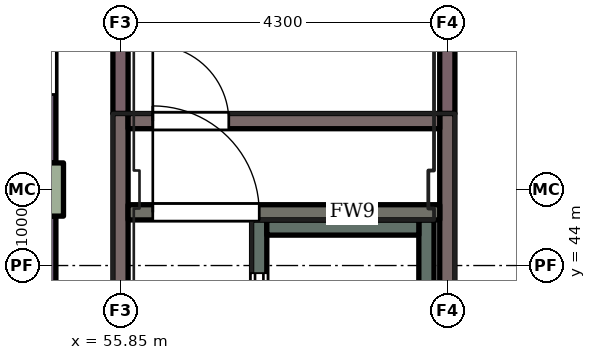
"""IFC4 building model, lengths in metres.
Left out: names, types, materials, properties, quantities, classifications, styles, units other than length and angle.
Written with IfcOpenShell. Run it as: python <this file> out.ifc"""

import sys

from ifc_helpers import new_model, si_unit, direction, frame, frame_2d, origin, origin_2d, place, context, subcontext, project, spatial, rectangle, extrude, element, fill, save


model = new_model("IFC4")
c1 = context("Model", 3, precision=1e-05, world=origin(), true_north=direction((0.0, 1.0)))
c2 = subcontext(c1, "Body", "Model", "MODEL_VIEW")
j1 = project(units=[si_unit("LENGTHUNIT", "METRE"), si_unit("PLANEANGLEUNIT", "RADIAN")], contexts=[c1])
p1 = place(None, origin())
s1 = spatial("IfcSite", under=j1, at=p1, CompositionType="ELEMENT")
p2 = place(p1, origin())
s2 = spatial("IfcBuilding", under=s1, at=p2, CompositionType="ELEMENT")
p3 = place(p2, frame((0.0, 0.0, 8.4)))
s3 = spatial("IfcBuildingStorey", under=s2, at=p3, CompositionType="ELEMENT", Elevation=8.4)
p4 = place(p3, frame((54.75, 45.0, 0.0), z_axis=(0.0, 0.0, 1.0), x_axis=(1.0, 0.0, 0.0)))
e1 = element("IfcColumn", 1, at=p4, inside=s3, PredefinedType="COLUMN", context=c2, shape_type="SweptSolid", body=[
    extrude(rectangle(XDim=0.7, YDim=0.7, at=origin_2d()), origin(), (0.0, 0.0, 1.0), 4.2),
])
p5 = place(p3, frame((54.75, 40.351, 0.0), z_axis=(0.0, 0.0, 1.0), x_axis=(0.0, 1.0, 0.0)))
e2 = element("IfcWall", 2, at=p5, inside=s3, PredefinedType="SHEAR", context=c2, shape_type="SweptSolid", body=[
    extrude(rectangle(XDim=4.299, YDim=0.5, at=frame_2d((2.149, 0.0))), origin(), (0.0, 0.0, 1.0), 3.4),
])
p6 = place(p5, frame((0.899, 0.0, 1.6)))
e3 = element("IfcOpeningElement", 3, at=p6, cuts=e2, PredefinedType="OPENING", context=c2, shape_type="SweptSolid", body=[
    extrude(rectangle(XDim=2.5, YDim=1.5, at=frame_2d((1.25, 0.75))), frame((0.0, 0.26, 0.0), z_axis=(0.0, -1.0, 0.0), x_axis=(1.0, 0.0, 0.0)), (0.0, 0.0, 1.0), 0.52),
])
p7 = place(p3, frame((54.75, 45.351, 0.0), z_axis=(0.0, 0.0, 1.0), x_axis=(0.0, 1.0, 0.0)))
e4 = element("IfcWall", 4, at=p7, inside=s3, PredefinedType="SHEAR", context=c2, shape_type="SweptSolid", body=[
    extrude(rectangle(XDim=4.299, YDim=0.5, at=frame_2d((2.149, 0.0))), origin(), (0.0, 0.0, 1.0), 3.4),
])
p8 = place(p7, frame((0.899, 0.0, 1.6)))
e5 = element("IfcOpeningElement", 5, at=p8, cuts=e4, PredefinedType="OPENING", context=c2, shape_type="SweptSolid", body=[
    extrude(rectangle(XDim=2.5, YDim=1.5, at=frame_2d((1.25, 0.75))), frame((0.0, 0.26, 0.0), z_axis=(0.0, -1.0, 0.0), x_axis=(1.0, 0.0, 0.0)), (0.0, 0.0, 1.0), 0.52),
])
for number, where, z_axis, x_axis in (
    (6, (60.15, 46.0, 0.0), (0.0, 0.0, 1.0), (0.0, 1.0, 0.0)),
    (7, (55.85, 46.0, 0.0), (0.0, 0.0, 1.0), (0.0, 1.0, 0.0)),
):
    element("IfcWall", number, at=place(p3, frame(where, z_axis=z_axis, x_axis=x_axis)), inside=s3, PredefinedType="PARAPET", context=c2, shape_type="SweptSolid", body=[
        extrude(rectangle(XDim=3.986, YDim=0.2, at=frame_2d((1.993, 0.0))), origin(), (0.0, 0.0, 1.0), 1.1),
    ])
p9 = place(p3, frame((57.675, 42.2, 0.0), z_axis=(0.0, 0.0, 1.0), x_axis=(0.0, 1.0, 0.0)))
e8 = element("IfcWall", 8, at=p9, inside=s3, PredefinedType="SHEAR", context=c2, shape_type="SweptSolid", body=[
    extrude(rectangle(XDim=2.4, YDim=0.2, at=frame_2d((1.2, 0.0))), origin(), (0.0, 0.0, 1.0), 3.0),
])
p10 = place(p9, frame((0.7, 0.0, 0.0)))
e9 = element("IfcOpeningElement", 9, at=p10, cuts=e8, PredefinedType="OPENING", context=c2, shape_type="SweptSolid", body=[
    extrude(rectangle(XDim=1.0, YDim=2.1, at=frame_2d((0.5, 1.05))), frame((0.0, 0.11, 0.0), z_axis=(0.0, -1.0, 0.0), x_axis=(1.0, 0.0, 0.0)), (0.0, 0.0, 1.0), 0.22),
])
p11 = place(p3, frame((59.875, 42.2, 0.0), z_axis=(0.0, 0.0, 1.0), x_axis=(0.0, 1.0, 0.0)))
e10 = element("IfcWall", 10, at=p11, inside=s3, PredefinedType="SHEAR", context=c2, shape_type="SweptSolid", body=[
    extrude(rectangle(XDim=2.4, YDim=0.2, at=frame_2d((1.2, 0.0))), origin(), (0.0, 0.0, 1.0), 3.0),
])
p12 = place(p3, frame((57.775, 44.5, 0.0), z_axis=(0.0, 0.0, 1.0), x_axis=(1.0, 0.0, 0.0)))
e11 = element("IfcWall", 11, at=p12, inside=s3, PredefinedType="SHEAR", context=c2, shape_type="SweptSolid", body=[
    extrude(rectangle(XDim=2.0, YDim=0.2, at=frame_2d((1.0, 0.0))), origin(), (0.0, 0.0, 1.0), 3.0),
])
for number, where, z_axis, x_axis in (
    (12, (55.85, 35.0, 0.0), (0.0, 0.0, 1.0), (0.0, 1.0, 0.0)),
    (13, (60.15, 35.0, 0.0), (0.0, 0.0, 1.0), (0.0, 1.0, 0.0)),
):
    element("IfcWall", number, at=place(p3, frame(where, z_axis=z_axis, x_axis=x_axis)), inside=s3, PredefinedType="STANDARD", context=c2, shape_type="SweptSolid", body=[
        extrude(rectangle(XDim=11.0, YDim=0.2, at=frame_2d((5.5, 0.0))), origin(), (0.0, 0.0, 1.0), 2.74),
    ])
p13 = place(p3, frame((55.95, 45.9, 0.0), z_axis=(0.0, 0.0, 1.0), x_axis=(1.0, 0.0, 0.0)))
e14 = element("IfcWall", 14, at=p13, inside=s3, PredefinedType="STANDARD", context=c2, shape_type="SweptSolid", body=[
    extrude(rectangle(XDim=4.1, YDim=0.2, at=frame_2d((2.05, 0.0))), origin(), (0.0, 0.0, 1.0), 2.74),
])
p14 = place(p13, frame((0.325, 0.0, 0.0)))
e15 = element("IfcOpeningElement", 15, at=p14, cuts=e14, PredefinedType="OPENING", context=c2, shape_type="SweptSolid", body=[
    extrude(rectangle(XDim=1.0, YDim=2.1, at=frame_2d((0.5, 1.05))), frame((0.0, 0.11, 0.0), z_axis=(0.0, -1.0, 0.0), x_axis=(1.0, 0.0, 0.0)), (0.0, 0.0, 1.0), 0.22),
])
p15 = place(p3, frame((55.95, 44.7, 0.0), z_axis=(0.0, 0.0, 1.0), x_axis=(1.0, 0.0, 0.0)))
e16 = element("IfcWall", 16, at=p15, inside=s3, PredefinedType="STANDARD", context=c2, shape_type="SweptSolid", body=[
    extrude(rectangle(XDim=4.1, YDim=0.2, at=frame_2d((2.05, 0.0))), origin(), (0.0, 0.0, 1.0), 2.74),
])
p16 = place(p15, frame((0.325, 0.0, 0.0)))
e17 = element("IfcOpeningElement", 17, at=p16, cuts=e16, PredefinedType="OPENING", context=c2, shape_type="SweptSolid", body=[
    extrude(rectangle(XDim=1.4, YDim=2.4, at=frame_2d((0.7, 1.2))), frame((0.0, 0.11, 0.0), z_axis=(0.0, -1.0, 0.0), x_axis=(1.0, 0.0, 0.0)), (0.0, 0.0, 1.0), 0.22),
])
p17 = place(p10, origin())
e18 = element("IfcDoor", 18, at=p17, inside=s3, OperationType="SLIDING_TO_LEFT", PredefinedType="DOOR", context=c2, shape_type="SweptSolid", body=[
    extrude(rectangle(XDim=1.0, YDim=2.1, at=frame_2d((0.5, 1.05))), frame((0.0, 0.025, 0.0), z_axis=(0.0, -1.0, 0.0), x_axis=(1.0, 0.0, 0.0)), (0.0, 0.0, 1.0), 0.05),
])
fill(e9, e18)
p18 = place(p14, origin())
e19 = element("IfcDoor", 19, at=p18, inside=s3, OperationType="SINGLE_SWING_LEFT", PredefinedType="DOOR", context=c2, shape_type="SweptSolid", body=[
    extrude(rectangle(XDim=1.0, YDim=2.1, at=frame_2d((0.5, 1.05))), frame((0.0, 0.025, 0.0), z_axis=(0.0, -1.0, 0.0), x_axis=(1.0, 0.0, 0.0)), (0.0, 0.0, 1.0), 0.05),
])
fill(e15, e19)
p19 = place(p16, origin())
e20 = element("IfcDoor", 20, at=p19, inside=s3, OperationType="DOUBLE_DOOR_SINGLE_SWING", PredefinedType="DOOR", context=c2, shape_type="SweptSolid", body=[
    extrude(rectangle(XDim=1.4, YDim=2.4, at=frame_2d((0.7, 1.2))), frame((0.0, 0.025, 0.0), z_axis=(0.0, -1.0, 0.0), x_axis=(1.0, 0.0, 0.0)), (0.0, 0.0, 1.0), 0.05),
])
fill(e17, e20)
save(model, sys.argv[1])
